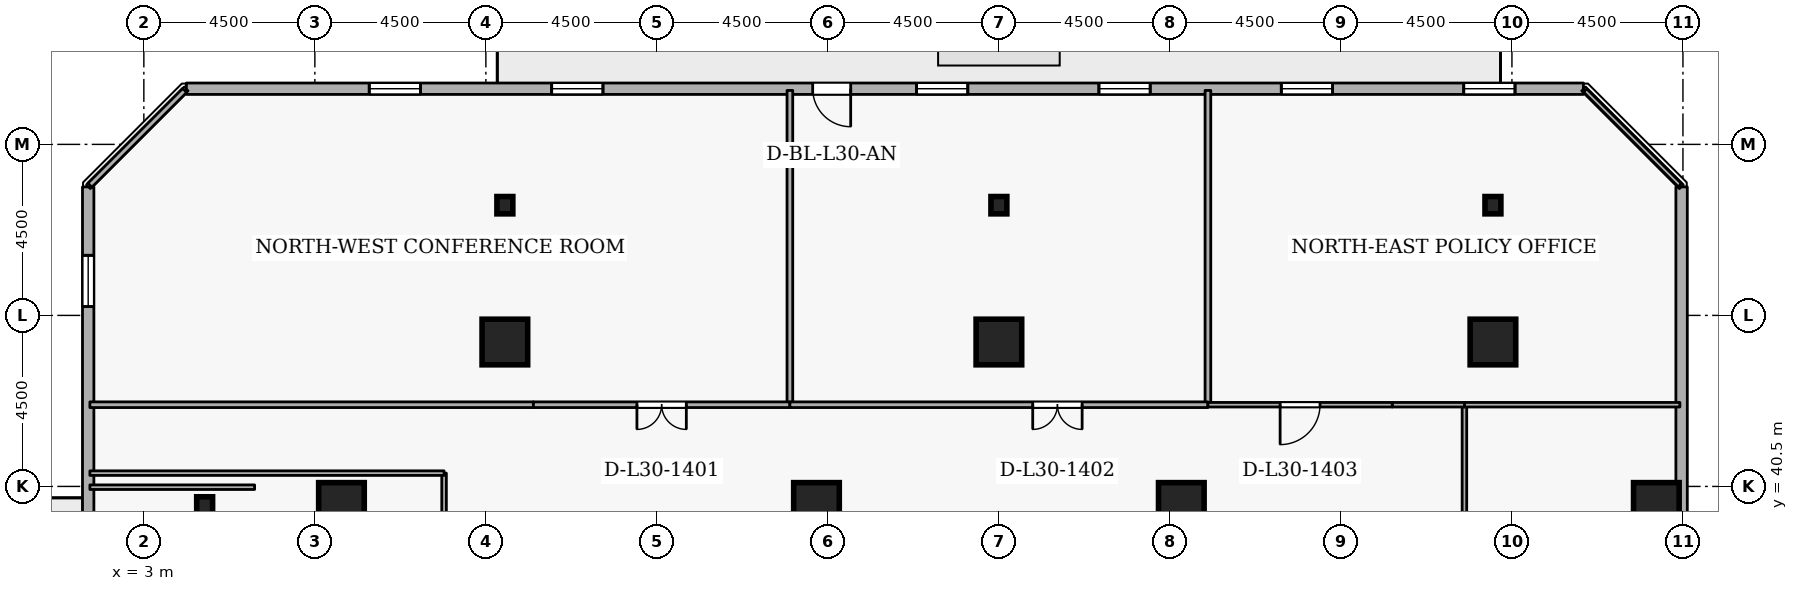
"""IFC4 building model, lengths in metres.
Left out: names, types, materials, properties, quantities, classifications, styles, units other than length and angle.
Written with IfcOpenShell. Run it as: python <this file> out.ifc"""

import sys

from ifc_helpers import new_model, si_unit, direction, frame, frame_2d, origin, origin_2d, place, context, subcontext, project, spatial, rectangle, i_section, extrude, element, fill, save


model = new_model("IFC4")
c1 = context("Model", 3, precision=1e-05, world=origin(), true_north=direction((0.0, 1.0)))
c2 = subcontext(c1, "Body", "Model", "MODEL_VIEW")
j1 = project(units=[si_unit("LENGTHUNIT", "METRE"), si_unit("PLANEANGLEUNIT", "RADIAN")], contexts=[c1])
p1 = place(None, origin())
s1 = spatial("IfcSite", under=j1, at=p1, CompositionType="ELEMENT")
p2 = place(p1, origin())
s2 = spatial("IfcBuilding", under=s1, at=p2, CompositionType="ELEMENT")
p3 = place(p2, frame((0.0, 0.0, 116.1)))
s3 = spatial("IfcBuildingStorey", under=s2, at=p3, CompositionType="ELEMENT", Elevation=116.1)
for number, where, z_axis, x_axis in (
    (1, (42.8, 40.0, 0.0), (0.0, 0.0, 1.0), (1.0, 0.0, 0.0)),
    (2, (12.5, 44.3, 0.0), (0.0, 0.0, 1.0), (1.0, 0.0, 0.0)),
    (3, (25.5, 44.3, 0.0), (0.0, 0.0, 1.0), (1.0, 0.0, 0.0)),
    (4, (38.5, 44.3, 0.0), (0.0, 0.0, 1.0), (1.0, 0.0, 0.0)),
    (5, (8.2, 40.0, 0.0), (0.0, 0.0, 1.0), (1.0, 0.0, 0.0)),
    (6, (20.7, 40.0, 0.0), (0.0, 0.0, 1.0), (1.0, 0.0, 0.0)),
    (7, (30.3, 40.0, 0.0), (0.0, 0.0, 1.0), (1.0, 0.0, 0.0)),
):
    element("IfcColumn", number, at=place(p3, frame(where, z_axis=z_axis, x_axis=x_axis)), inside=s3, PredefinedType="COLUMN", context=c2, shape_type="SweptSolid", body=[
        extrude(rectangle(XDim=1.2, YDim=1.2, at=origin_2d()), origin(), (0.0, 0.0, 1.0), 3.6),
    ])
for number, where, z_axis, x_axis in (
    (8, (12.5, 47.9, 0.0), (0.0, 0.0, 1.0), (1.0, 0.0, 0.0)),
    (9, (25.5, 47.9, 0.0), (0.0, 0.0, 1.0), (1.0, 0.0, 0.0)),
    (10, (38.5, 47.9, 0.0), (0.0, 0.0, 1.0), (1.0, 0.0, 0.0)),
    (11, (4.6, 40.0, 0.0), (0.0, 0.0, 1.0), (1.0, 0.0, 0.0)),
):
    element("IfcColumn", number, at=place(p3, frame(where, z_axis=z_axis, x_axis=x_axis)), inside=s3, PredefinedType="COLUMN", context=c2, shape_type="SweptSolid", body=[
        extrude(i_section(OverallWidth=0.418, OverallDepth=0.456, WebThickness=0.042, FlangeThickness=0.067, FilletRadius=0.015, at=origin_2d()), origin(), (0.0, 0.0, 1.0), 3.6),
    ])
p4 = place(p3, frame((43.465, 11.619, 0.0), z_axis=(0.0, 0.0, 1.0), x_axis=(0.0, 1.0, 0.0)))
e12 = element("IfcWall", 12, at=p4, inside=s3, PredefinedType="STANDARD", context=c2, shape_type="SweptSolid", body=[
    extrude(rectangle(XDim=36.763, YDim=0.3, at=frame_2d((18.381, 0.0))), origin(), (0.0, 0.0, 1.0), 2.22),
])
p5 = place(p4, frame((6.6, 0.0, 0.72)))
e13 = element("IfcOpeningElement", 13, at=p5, cuts=e12, PredefinedType="OPENING", context=c2, shape_type="SweptSolid", body=[
    extrude(rectangle(XDim=1.35, YDim=1.05, at=frame_2d((0.675, 0.525))), frame((0.0, 0.16, 0.0), z_axis=(0.0, -1.0, 0.0), x_axis=(1.0, 0.0, 0.0)), (0.0, 0.0, 1.0), 0.32),
])
p6 = place(p4, frame((11.4, 0.0, 0.72)))
e14 = element("IfcOpeningElement", 14, at=p6, cuts=e12, PredefinedType="OPENING", context=c2, shape_type="SweptSolid", body=[
    extrude(rectangle(XDim=1.35, YDim=1.05, at=frame_2d((0.675, 0.525))), frame((0.0, 0.16, 0.0), z_axis=(0.0, -1.0, 0.0), x_axis=(1.0, 0.0, 0.0)), (0.0, 0.0, 1.0), 0.32),
])
p7 = place(p4, frame((21.0, 0.0, 0.72)))
e15 = element("IfcOpeningElement", 15, at=p7, cuts=e12, PredefinedType="OPENING", context=c2, shape_type="SweptSolid", body=[
    extrude(rectangle(XDim=1.35, YDim=1.05, at=frame_2d((0.675, 0.525))), frame((0.0, 0.16, 0.0), z_axis=(0.0, -1.0, 0.0), x_axis=(1.0, 0.0, 0.0)), (0.0, 0.0, 1.0), 0.32),
])
p8 = place(p4, frame((25.8, 0.0, 0.72)))
e16 = element("IfcOpeningElement", 16, at=p8, cuts=e12, PredefinedType="OPENING", context=c2, shape_type="SweptSolid", body=[
    extrude(rectangle(XDim=1.35, YDim=1.05, at=frame_2d((0.675, 0.525))), frame((0.0, 0.16, 0.0), z_axis=(0.0, -1.0, 0.0), x_axis=(1.0, 0.0, 0.0)), (0.0, 0.0, 1.0), 0.32),
])
p9 = place(p3, frame((40.881, 50.965, 0.0), z_axis=(0.0, 0.0, 1.0), x_axis=(-1.0, 0.0, 0.0)))
e17 = element("IfcWall", 17, at=p9, inside=s3, PredefinedType="STANDARD", context=c2, shape_type="SweptSolid", body=[
    extrude(rectangle(XDim=36.763, YDim=0.3, at=frame_2d((18.381, 0.0))), origin(), (0.0, 0.0, 1.0), 2.22),
])
p10 = place(p9, frame((19.281, 0.0, 0.0)))
e18 = element("IfcOpeningElement", 18, at=p10, cuts=e17, PredefinedType="OPENING", context=c2, shape_type="SweptSolid", body=[
    extrude(rectangle(XDim=1.0, YDim=2.08, at=frame_2d((0.5, 1.04))), frame((0.0, 0.16, 0.0), z_axis=(0.0, -1.0, 0.0), x_axis=(1.0, 0.0, 0.0)), (0.0, 0.0, 1.0), 0.32),
])
p11 = place(p9, frame((1.8, 0.0, 0.72)))
e19 = element("IfcOpeningElement", 19, at=p11, cuts=e17, PredefinedType="OPENING", context=c2, shape_type="SweptSolid", body=[
    extrude(rectangle(XDim=1.35, YDim=1.05, at=frame_2d((0.675, 0.525))), frame((0.0, 0.16, 0.0), z_axis=(0.0, -1.0, 0.0), x_axis=(1.0, 0.0, 0.0)), (0.0, 0.0, 1.0), 0.32),
])
p12 = place(p9, frame((6.6, 0.0, 0.72)))
e20 = element("IfcOpeningElement", 20, at=p12, cuts=e17, PredefinedType="OPENING", context=c2, shape_type="SweptSolid", body=[
    extrude(rectangle(XDim=1.35, YDim=1.05, at=frame_2d((0.675, 0.525))), frame((0.0, 0.16, 0.0), z_axis=(0.0, -1.0, 0.0), x_axis=(1.0, 0.0, 0.0)), (0.0, 0.0, 1.0), 0.32),
])
p13 = place(p9, frame((11.4, 0.0, 0.72)))
e21 = element("IfcOpeningElement", 21, at=p13, cuts=e17, PredefinedType="OPENING", context=c2, shape_type="SweptSolid", body=[
    extrude(rectangle(XDim=1.35, YDim=1.05, at=frame_2d((0.675, 0.525))), frame((0.0, 0.16, 0.0), z_axis=(0.0, -1.0, 0.0), x_axis=(1.0, 0.0, 0.0)), (0.0, 0.0, 1.0), 0.32),
])
p14 = place(p9, frame((16.2, 0.0, 0.72)))
e22 = element("IfcOpeningElement", 22, at=p14, cuts=e17, PredefinedType="OPENING", context=c2, shape_type="SweptSolid", body=[
    extrude(rectangle(XDim=1.35, YDim=1.05, at=frame_2d((0.675, 0.525))), frame((0.0, 0.16, 0.0), z_axis=(0.0, -1.0, 0.0), x_axis=(1.0, 0.0, 0.0)), (0.0, 0.0, 1.0), 0.32),
])
p15 = place(p9, frame((25.8, 0.0, 0.72)))
e23 = element("IfcOpeningElement", 23, at=p15, cuts=e17, PredefinedType="OPENING", context=c2, shape_type="SweptSolid", body=[
    extrude(rectangle(XDim=1.35, YDim=1.05, at=frame_2d((0.675, 0.525))), frame((0.0, 0.16, 0.0), z_axis=(0.0, -1.0, 0.0), x_axis=(1.0, 0.0, 0.0)), (0.0, 0.0, 1.0), 0.32),
])
p16 = place(p9, frame((30.6, 0.0, 0.72)))
e24 = element("IfcOpeningElement", 24, at=p16, cuts=e17, PredefinedType="OPENING", context=c2, shape_type="SweptSolid", body=[
    extrude(rectangle(XDim=1.35, YDim=1.05, at=frame_2d((0.675, 0.525))), frame((0.0, 0.16, 0.0), z_axis=(0.0, -1.0, 0.0), x_axis=(1.0, 0.0, 0.0)), (0.0, 0.0, 1.0), 0.32),
])
p17 = place(p3, frame((1.535, 48.381, 0.0), z_axis=(0.0, 0.0, 1.0), x_axis=(0.0, -1.0, 0.0)))
e25 = element("IfcWall", 25, at=p17, inside=s3, PredefinedType="STANDARD", context=c2, shape_type="SweptSolid", body=[
    extrude(rectangle(XDim=36.763, YDim=0.3, at=frame_2d((18.381, 0.0))), origin(), (0.0, 0.0, 1.0), 2.22),
])
p18 = place(p17, frame((19.281, 0.0, 0.0)))
e26 = element("IfcOpeningElement", 26, at=p18, cuts=e25, PredefinedType="OPENING", context=c2, shape_type="SweptSolid", body=[
    extrude(rectangle(XDim=1.0, YDim=2.08, at=frame_2d((0.5, 1.04))), frame((0.0, 0.16, 0.0), z_axis=(0.0, -1.0, 0.0), x_axis=(1.0, 0.0, 0.0)), (0.0, 0.0, 1.0), 0.32),
])
p19 = place(p17, frame((1.8, 0.0, 0.72)))
e27 = element("IfcOpeningElement", 27, at=p19, cuts=e25, PredefinedType="OPENING", context=c2, shape_type="SweptSolid", body=[
    extrude(rectangle(XDim=1.35, YDim=1.05, at=frame_2d((0.675, 0.525))), frame((0.0, 0.16, 0.0), z_axis=(0.0, -1.0, 0.0), x_axis=(1.0, 0.0, 0.0)), (0.0, 0.0, 1.0), 0.32),
])
p20 = place(p17, frame((11.4, 0.0, 0.72)))
e28 = element("IfcOpeningElement", 28, at=p20, cuts=e25, PredefinedType="OPENING", context=c2, shape_type="SweptSolid", body=[
    extrude(rectangle(XDim=1.35, YDim=1.05, at=frame_2d((0.675, 0.525))), frame((0.0, 0.16, 0.0), z_axis=(0.0, -1.0, 0.0), x_axis=(1.0, 0.0, 0.0)), (0.0, 0.0, 1.0), 0.32),
])
p21 = place(p17, frame((16.2, 0.0, 0.72)))
e29 = element("IfcOpeningElement", 29, at=p21, cuts=e25, PredefinedType="OPENING", context=c2, shape_type="SweptSolid", body=[
    extrude(rectangle(XDim=1.35, YDim=1.05, at=frame_2d((0.675, 0.525))), frame((0.0, 0.16, 0.0), z_axis=(0.0, -1.0, 0.0), x_axis=(1.0, 0.0, 0.0)), (0.0, 0.0, 1.0), 0.32),
])
p22 = place(p17, frame((25.8, 0.0, 0.72)))
e30 = element("IfcOpeningElement", 30, at=p22, cuts=e25, PredefinedType="OPENING", context=c2, shape_type="SweptSolid", body=[
    extrude(rectangle(XDim=1.35, YDim=1.05, at=frame_2d((0.675, 0.525))), frame((0.0, 0.16, 0.0), z_axis=(0.0, -1.0, 0.0), x_axis=(1.0, 0.0, 0.0)), (0.0, 0.0, 1.0), 0.32),
])
p23 = place(p17, frame((30.6, 0.0, 0.72)))
e31 = element("IfcOpeningElement", 31, at=p23, cuts=e25, PredefinedType="OPENING", context=c2, shape_type="SweptSolid", body=[
    extrude(rectangle(XDim=1.35, YDim=1.05, at=frame_2d((0.675, 0.525))), frame((0.0, 0.16, 0.0), z_axis=(0.0, -1.0, 0.0), x_axis=(1.0, 0.0, 0.0)), (0.0, 0.0, 1.0), 0.32),
])
p24 = place(p3, frame((10.9, 40.85, 0.0), z_axis=(0.0, 0.0, 1.0), x_axis=(0.0, -1.0, 0.0)))
e32 = element("IfcWall", 32, at=p24, inside=s3, PredefinedType="PARTITIONING", context=c2, shape_type="SweptSolid", body=[
    extrude(rectangle(XDim=4.912, YDim=0.12, at=frame_2d((2.456, 0.0))), origin(), (0.0, 0.0, 1.0), 3.32),
])
p25 = place(p3, frame((5.914, 40.48, 0.0), z_axis=(0.0, 0.0, 1.0), x_axis=(-1.0, 0.0, 0.0)))
e33 = element("IfcWall", 33, at=p25, inside=s3, PredefinedType="PARTITIONING", context=c2, shape_type="SweptSolid", body=[
    extrude(rectangle(XDim=4.334, YDim=0.12, at=frame_2d((2.167, 0.0))), origin(), (0.0, 0.0, 1.0), 1.685),
])
p26 = place(p3, frame((1.58, 40.85, 0.0), z_axis=(0.0, 0.0, 1.0), x_axis=(1.0, 0.0, 0.0)))
e34 = element("IfcWall", 34, at=p26, inside=s3, PredefinedType="PARTITIONING", context=c2, shape_type="SweptSolid", body=[
    extrude(rectangle(XDim=9.32, YDim=0.12, at=frame_2d((4.66, 0.0))), origin(), (0.0, 0.0, 1.0), 3.32),
])
p27 = place(p3, frame((37.75, 33.3, 0.0), z_axis=(0.0, 0.0, 1.0), x_axis=(0.0, 1.0, 0.0)))
e35 = element("IfcWall", 35, at=p27, inside=s3, PredefinedType="PARTITIONING", context=c2, shape_type="SweptSolid", body=[
    extrude(rectangle(XDim=9.35, YDim=0.12, at=frame_2d((4.675, 0.0))), origin(), (0.0, 0.0, 1.0), 3.32),
])
p28 = place(p27, frame((4.2, 0.0, 0.0)))
e36 = element("IfcOpeningElement", 36, at=p28, cuts=e35, PredefinedType="OPENING", context=c2, shape_type="SweptSolid", body=[
    extrude(rectangle(XDim=0.95, YDim=2.1, at=frame_2d((0.475, 1.05))), frame((0.0, 0.07, 0.0), z_axis=(0.0, -1.0, 0.0), x_axis=(1.0, 0.0, 0.0)), (0.0, 0.0, 1.0), 0.14),
])
p29 = place(p3, frame((37.75, 42.65, 0.0), z_axis=(0.0, 0.0, 1.0), x_axis=(1.0, 0.0, 0.0)))
e37 = element("IfcWall", 37, at=p29, inside=s3, PredefinedType="PARTITIONING", context=c2, shape_type="SweptSolid", body=[
    extrude(rectangle(XDim=5.67, YDim=0.12, at=frame_2d((2.835, 0.0))), origin(), (0.0, 0.0, 1.0), 3.32),
])
p30 = place(p3, frame((13.25, 42.65, 0.0), z_axis=(0.0, 0.0, 1.0), x_axis=(-1.0, 0.0, 0.0)))
e38 = element("IfcWall", 38, at=p30, inside=s3, PredefinedType="PARTITIONING", context=c2, shape_type="SweptSolid", body=[
    extrude(rectangle(XDim=11.67, YDim=0.15, at=frame_2d((5.835, 0.0))), origin(), (0.0, 0.0, 1.0), 3.32),
])
p31 = place(p3, frame((1.58, 48.425, 0.0), z_axis=(0.0, 0.0, 1.0), x_axis=(0.707106781187, 0.707106781187, 0.0)))
e39 = element("IfcWall", 39, at=p31, inside=s3, PredefinedType="PARTITIONING", context=c2, shape_type="SweptSolid", body=[
    extrude(rectangle(XDim=3.528, YDim=0.15, at=frame_2d((1.764, 0.0))), origin(), (0.0, 0.0, 1.0), 3.32),
])
p32 = place(p3, frame((20.0, 50.92, 0.0), z_axis=(0.0, 0.0, 1.0), x_axis=(0.0, -1.0, 0.0)))
e40 = element("IfcWall", 40, at=p32, inside=s3, PredefinedType="PARTITIONING", context=c2, shape_type="SweptSolid", body=[
    extrude(rectangle(XDim=8.27, YDim=0.15, at=frame_2d((4.135, 0.0))), origin(), (0.0, 0.0, 1.0), 3.32),
])
p33 = place(p3, frame((20.0, 42.65, 0.0), z_axis=(0.0, 0.0, 1.0), x_axis=(-1.0, 0.0, 0.0)))
e41 = element("IfcWall", 41, at=p33, inside=s3, PredefinedType="PARTITIONING", context=c2, shape_type="SweptSolid", body=[
    extrude(rectangle(XDim=6.75, YDim=0.15, at=frame_2d((3.375, 0.0))), origin(), (0.0, 0.0, 1.0), 3.32),
])
p34 = place(p33, frame((2.725, 0.0, 0.0)))
e42 = element("IfcOpeningElement", 42, at=p34, cuts=e41, PredefinedType="OPENING", context=c2, shape_type="SweptSolid", body=[
    extrude(rectangle(XDim=1.3, YDim=2.12, at=frame_2d((0.65, 1.06))), frame((0.0, 0.085, 0.0), z_axis=(0.0, -1.0, 0.0), x_axis=(1.0, 0.0, 0.0)), (0.0, 0.0, 1.0), 0.17),
])
p35 = place(p3, frame((31.0, 50.92, 0.0), z_axis=(0.0, 0.0, 1.0), x_axis=(0.0, -1.0, 0.0)))
e43 = element("IfcWall", 43, at=p35, inside=s3, PredefinedType="PARTITIONING", context=c2, shape_type="SweptSolid", body=[
    extrude(rectangle(XDim=8.27, YDim=0.15, at=frame_2d((4.135, 0.0))), origin(), (0.0, 0.0, 1.0), 3.32),
])
p36 = place(p3, frame((31.0, 42.65, 0.0), z_axis=(0.0, 0.0, 1.0), x_axis=(-1.0, 0.0, 0.0)))
e44 = element("IfcWall", 44, at=p36, inside=s3, PredefinedType="PARTITIONING", context=c2, shape_type="SweptSolid", body=[
    extrude(rectangle(XDim=11.0, YDim=0.15, at=frame_2d((5.5, 0.0))), origin(), (0.0, 0.0, 1.0), 3.32),
])
p37 = place(p36, frame((3.31, 0.0, 0.0)))
e45 = element("IfcOpeningElement", 45, at=p37, cuts=e44, PredefinedType="OPENING", context=c2, shape_type="SweptSolid", body=[
    extrude(rectangle(XDim=1.3, YDim=2.12, at=frame_2d((0.65, 1.06))), frame((0.0, 0.085, 0.0), z_axis=(0.0, -1.0, 0.0), x_axis=(1.0, 0.0, 0.0)), (0.0, 0.0, 1.0), 0.17),
])
p38 = place(p3, frame((37.75, 42.65, 0.0), z_axis=(0.0, 0.0, 1.0), x_axis=(-1.0, 0.0, 0.0)))
e46 = element("IfcWall", 46, at=p38, inside=s3, PredefinedType="PARTITIONING", context=c2, shape_type="SweptSolid", body=[
    extrude(rectangle(XDim=1.9, YDim=0.12, at=frame_2d((0.95, 0.0))), origin(), (0.0, 0.0, 1.0), 3.32),
])
p39 = place(p3, frame((35.85, 42.65, 0.0), z_axis=(0.0, 0.0, 1.0), x_axis=(-1.0, 0.0, 0.0)))
e47 = element("IfcWall", 47, at=p39, inside=s3, PredefinedType="PARTITIONING", context=c2, shape_type="SweptSolid", body=[
    extrude(rectangle(XDim=4.85, YDim=0.12, at=frame_2d((2.425, 0.0))), origin(), (0.0, 0.0, 1.0), 2.875),
])
p40 = place(p39, frame((1.9, 0.0, 0.0)))
e48 = element("IfcOpeningElement", 48, at=p40, cuts=e47, PredefinedType="OPENING", context=c2, shape_type="SweptSolid", body=[
    extrude(rectangle(XDim=1.05, YDim=2.1, at=frame_2d((0.525, 1.05))), frame((0.0, 0.07, 0.0), z_axis=(0.0, -1.0, 0.0), x_axis=(1.0, 0.0, 0.0)), (0.0, 0.0, 1.0), 0.14),
])
p41 = place(p3, frame((40.925, 50.92, 0.0), z_axis=(0.0, 0.0, 1.0), x_axis=(0.707106781187, -0.707106781187, 0.0)))
e49 = element("IfcWall", 49, at=p41, inside=s3, PredefinedType="PARTITIONING", context=c2, shape_type="SweptSolid", body=[
    extrude(rectangle(XDim=3.528, YDim=0.12, at=frame_2d((1.764, 0.0))), origin(), (0.0, 0.0, 1.0), 3.32),
])
p42 = place(p10, origin())
e50 = element("IfcDoor", 50, at=p42, inside=s3, OperationType="SINGLE_SWING_LEFT", PredefinedType="DOOR", context=c2, shape_type="SweptSolid", body=[
    extrude(rectangle(XDim=1.0, YDim=2.08, at=frame_2d((0.5, 1.04))), frame((0.0, 0.025, 0.0), z_axis=(0.0, -1.0, 0.0), x_axis=(1.0, 0.0, 0.0)), (0.0, 0.0, 1.0), 0.05),
])
fill(e18, e50)
p43 = place(p11, origin())
e51 = element("IfcWindow", 51, at=p43, inside=s3, PartitioningType="SINGLE_PANEL", PredefinedType="WINDOW", context=c2, shape_type="SweptSolid", body=[
    extrude(rectangle(XDim=1.35, YDim=1.05, at=frame_2d((0.675, 0.525))), frame((0.0, 0.03, 0.0), z_axis=(0.0, -1.0, 0.0), x_axis=(1.0, 0.0, 0.0)), (0.0, 0.0, 1.0), 0.06),
])
fill(e19, e51)
p44 = place(p12, origin())
e52 = element("IfcWindow", 52, at=p44, inside=s3, PartitioningType="SINGLE_PANEL", PredefinedType="WINDOW", context=c2, shape_type="SweptSolid", body=[
    extrude(rectangle(XDim=1.35, YDim=1.05, at=frame_2d((0.675, 0.525))), frame((0.0, 0.03, 0.0), z_axis=(0.0, -1.0, 0.0), x_axis=(1.0, 0.0, 0.0)), (0.0, 0.0, 1.0), 0.06),
])
fill(e20, e52)
p45 = place(p13, origin())
e53 = element("IfcWindow", 53, at=p45, inside=s3, PartitioningType="SINGLE_PANEL", PredefinedType="WINDOW", context=c2, shape_type="SweptSolid", body=[
    extrude(rectangle(XDim=1.35, YDim=1.05, at=frame_2d((0.675, 0.525))), frame((0.0, 0.03, 0.0), z_axis=(0.0, -1.0, 0.0), x_axis=(1.0, 0.0, 0.0)), (0.0, 0.0, 1.0), 0.06),
])
fill(e21, e53)
p46 = place(p14, origin())
e54 = element("IfcWindow", 54, at=p46, inside=s3, PartitioningType="SINGLE_PANEL", PredefinedType="WINDOW", context=c2, shape_type="SweptSolid", body=[
    extrude(rectangle(XDim=1.35, YDim=1.05, at=frame_2d((0.675, 0.525))), frame((0.0, 0.03, 0.0), z_axis=(0.0, -1.0, 0.0), x_axis=(1.0, 0.0, 0.0)), (0.0, 0.0, 1.0), 0.06),
])
fill(e22, e54)
p47 = place(p15, origin())
e55 = element("IfcWindow", 55, at=p47, inside=s3, PartitioningType="SINGLE_PANEL", PredefinedType="WINDOW", context=c2, shape_type="SweptSolid", body=[
    extrude(rectangle(XDim=1.35, YDim=1.05, at=frame_2d((0.675, 0.525))), frame((0.0, 0.03, 0.0), z_axis=(0.0, -1.0, 0.0), x_axis=(1.0, 0.0, 0.0)), (0.0, 0.0, 1.0), 0.06),
])
fill(e23, e55)
p48 = place(p16, origin())
e56 = element("IfcWindow", 56, at=p48, inside=s3, PartitioningType="SINGLE_PANEL", PredefinedType="WINDOW", context=c2, shape_type="SweptSolid", body=[
    extrude(rectangle(XDim=1.35, YDim=1.05, at=frame_2d((0.675, 0.525))), frame((0.0, 0.03, 0.0), z_axis=(0.0, -1.0, 0.0), x_axis=(1.0, 0.0, 0.0)), (0.0, 0.0, 1.0), 0.06),
])
fill(e24, e56)
p49 = place(p19, origin())
e57 = element("IfcWindow", 57, at=p49, inside=s3, PartitioningType="SINGLE_PANEL", PredefinedType="WINDOW", context=c2, shape_type="SweptSolid", body=[
    extrude(rectangle(XDim=1.35, YDim=1.05, at=frame_2d((0.675, 0.525))), frame((0.0, 0.03, 0.0), z_axis=(0.0, -1.0, 0.0), x_axis=(1.0, 0.0, 0.0)), (0.0, 0.0, 1.0), 0.06),
])
fill(e27, e57)
p50 = place(p34, origin())
e58 = element("IfcDoor", 58, at=p50, inside=s3, OperationType="DOUBLE_DOOR_SINGLE_SWING", PredefinedType="DOOR", context=c2, shape_type="SweptSolid", body=[
    extrude(rectangle(XDim=1.3, YDim=2.12, at=frame_2d((0.65, 1.06))), frame((0.0, 0.025, 0.0), z_axis=(0.0, -1.0, 0.0), x_axis=(1.0, 0.0, 0.0)), (0.0, 0.0, 1.0), 0.05),
])
fill(e42, e58)
p51 = place(p37, origin())
e59 = element("IfcDoor", 59, at=p51, inside=s3, OperationType="DOUBLE_DOOR_SINGLE_SWING", PredefinedType="DOOR", context=c2, shape_type="SweptSolid", body=[
    extrude(rectangle(XDim=1.3, YDim=2.12, at=frame_2d((0.65, 1.06))), frame((0.0, 0.025, 0.0), z_axis=(0.0, -1.0, 0.0), x_axis=(1.0, 0.0, 0.0)), (0.0, 0.0, 1.0), 0.05),
])
fill(e45, e59)
p52 = place(p40, origin())
e60 = element("IfcDoor", 60, at=p52, inside=s3, OperationType="SINGLE_SWING_RIGHT", PredefinedType="DOOR", context=c2, shape_type="SweptSolid", body=[
    extrude(rectangle(XDim=1.05, YDim=2.1, at=frame_2d((0.525, 1.05))), frame((0.0, 0.025, 0.0), z_axis=(0.0, -1.0, 0.0), x_axis=(1.0, 0.0, 0.0)), (0.0, 0.0, 1.0), 0.05),
])
fill(e48, e60)
save(model, sys.argv[1])
